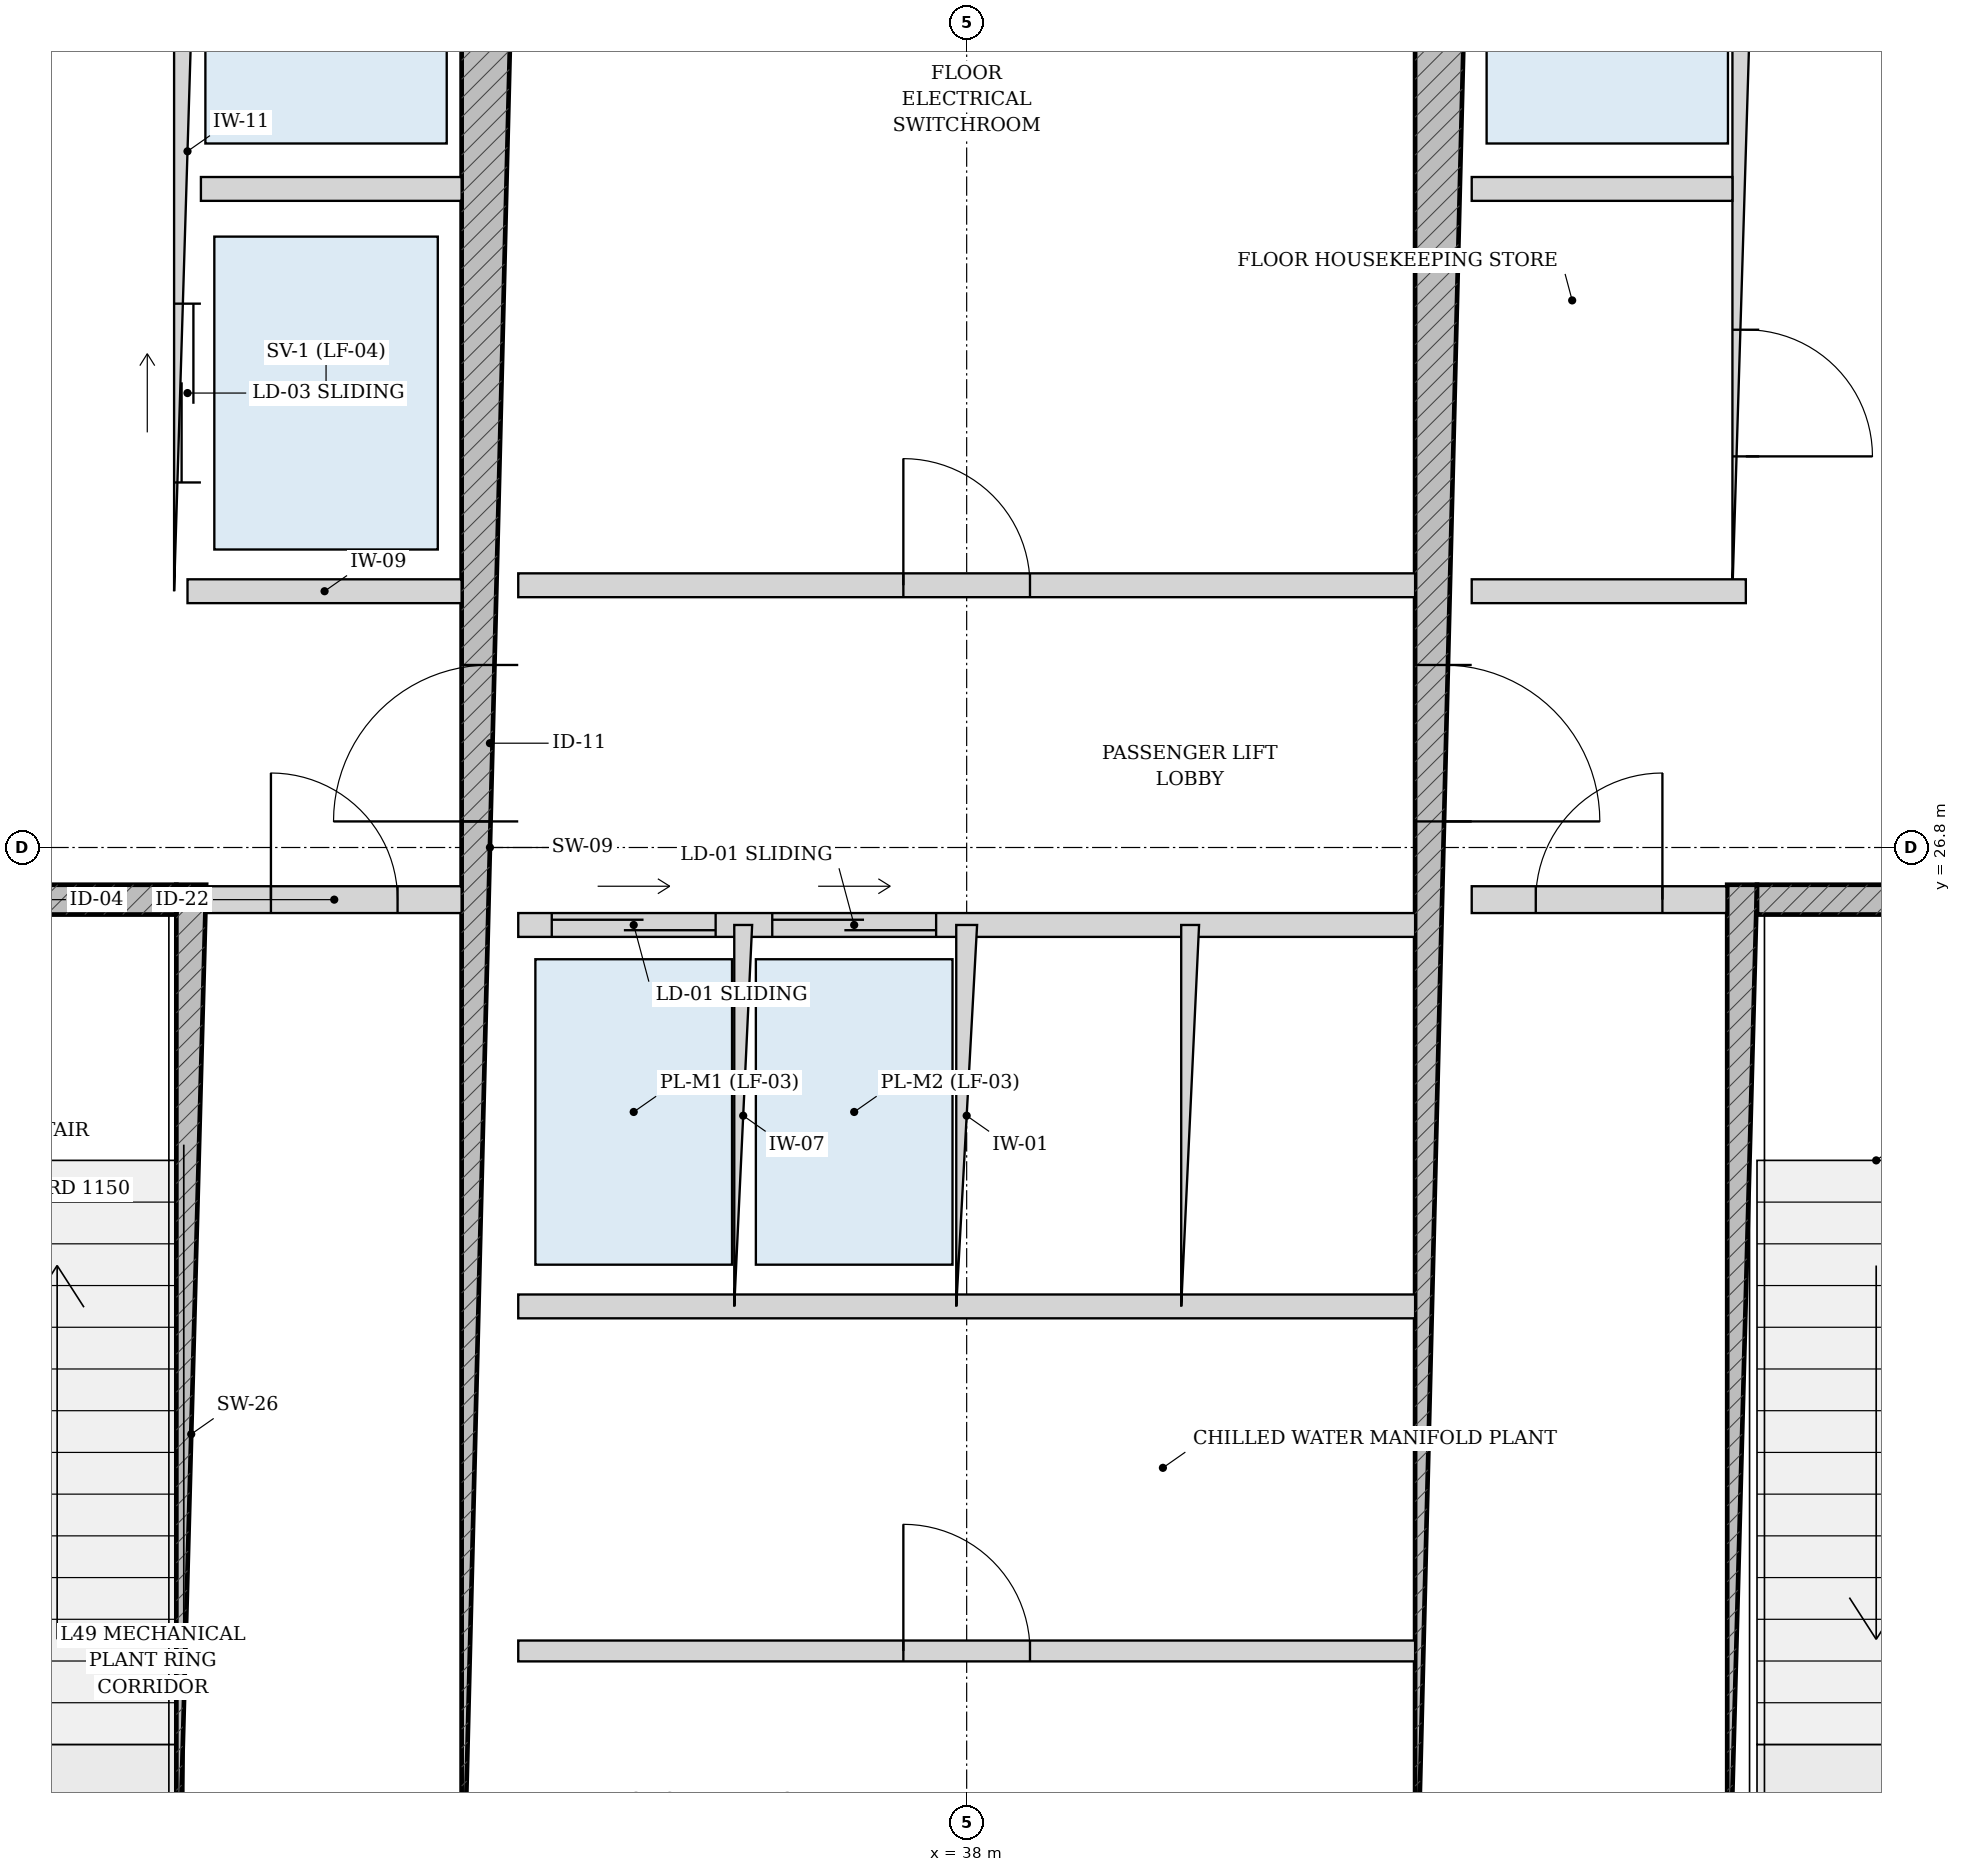
"""IFC4 building model, lengths in metres.
Left out: names, types, materials, properties, quantities, classifications, styles, units other than length and angle.
Written with IfcOpenShell. Run it as: python <this file> out.ifc"""

import sys

from ifc_helpers import new_model, si_unit, direction, frame, frame_2d, origin, place, context, subcontext, project, spatial, rectangle, extrude, source, transform, mapped, element, fill, save


model = new_model("IFC4")
c1 = context("Model", 3, precision=1e-05, world=origin(), true_north=direction((-0.2419218956, 0.970295726276)))
c2 = subcontext(c1, "Body", "Model", "MODEL_VIEW")
j1 = project(units=[si_unit("LENGTHUNIT", "METRE"), si_unit("PLANEANGLEUNIT", "RADIAN")], contexts=[c1])
p1 = place(None, origin())
s1 = spatial("IfcSite", under=j1, at=p1, CompositionType="ELEMENT")
p2 = place(p1, origin())
s2 = spatial("IfcBuilding", under=s1, at=p2, CompositionType="ELEMENT")
p3 = place(p2, frame((0.0, 0.0, 185.8)))
s3 = spatial("IfcBuildingStorey", under=s2, at=p3, CompositionType="ELEMENT", Elevation=185.8)
p4 = place(p3, frame((32.795, 19.175, 0.0), z_axis=(0.0, 0.0, 1.0), x_axis=(0.0, 1.0, 0.0)))
e1 = element("IfcWall", 1, at=p4, inside=s3, PredefinedType="SOLIDWALL", context=c2, shape_type="SweptSolid", body=[
    extrude(rectangle(XDim=7.375, YDim=0.2, at=frame_2d((3.688, 0.0))), origin(), (0.0, 0.0, 1.0), 5.135),
])
p5 = place(p3, frame((29.375, 26.45, 0.0), z_axis=(0.0, 0.0, 1.0), x_axis=(1.0, 0.0, 0.0)))
e2 = element("IfcWall", 2, at=p5, inside=s3, PredefinedType="SOLIDWALL", context=c2, shape_type="SweptSolid", body=[
    extrude(rectangle(XDim=3.32, YDim=0.2, at=frame_2d((1.66, 0.0))), origin(), (0.0, 0.0, 1.0), 5.135),
])
p6 = place(p5, frame((1.185, 0.0, 0.0)))
e3 = element("IfcOpeningElement", 3, at=p6, cuts=e2, PredefinedType="OPENING", context=c2, shape_type="SweptSolid", body=[
    extrude(rectangle(XDim=0.95, YDim=2.15, at=frame_2d((0.475, 1.075))), frame((0.0, 0.11, 0.0), z_axis=(0.0, -1.0, 0.0), x_axis=(1.0, 0.0, 0.0)), (0.0, 0.0, 1.0), 0.22),
])
p7 = place(p3, frame((43.205, 19.175, 0.0), z_axis=(0.0, 0.0, 1.0), x_axis=(0.0, 1.0, 0.0)))
e4 = element("IfcWall", 4, at=p7, inside=s3, PredefinedType="SOLIDWALL", context=c2, shape_type="SweptSolid", body=[
    extrude(rectangle(XDim=7.375, YDim=0.2, at=frame_2d((3.688, 0.0))), origin(), (0.0, 0.0, 1.0), 5.135),
])
p8 = place(p3, frame((43.305, 26.45, 0.0), z_axis=(0.0, 0.0, 1.0), x_axis=(1.0, 0.0, 0.0)))
e5 = element("IfcWall", 5, at=p8, inside=s3, PredefinedType="SOLIDWALL", context=c2, shape_type="SweptSolid", body=[
    extrude(rectangle(XDim=3.32, YDim=0.2, at=frame_2d((1.66, 0.0))), origin(), (0.0, 0.0, 1.0), 5.135),
])
p9 = place(p8, frame((1.185, 0.0, 0.0)))
e6 = element("IfcOpeningElement", 6, at=p9, cuts=e5, PredefinedType="OPENING", context=c2, shape_type="SweptSolid", body=[
    extrude(rectangle(XDim=0.95, YDim=2.15, at=frame_2d((0.475, 1.075))), frame((0.0, 0.11, 0.0), z_axis=(0.0, -1.0, 0.0), x_axis=(1.0, 0.0, 0.0)), (0.0, 0.0, 1.0), 0.22),
])
p10 = place(p3, frame((34.8, 19.175, 0.0), z_axis=(0.0, 0.0, 1.0), x_axis=(0.0, 1.0, 0.0)))
e7 = element("IfcWall", 7, at=p10, inside=s3, PredefinedType="SHEAR", context=c2, shape_type="SweptSolid", body=[
    extrude(rectangle(XDim=15.25, YDim=0.38, at=frame_2d((7.625, 0.0))), origin(), (0.0, 0.0, 1.0), 5.135),
])
p11 = place(p10, frame((7.8, 0.0, 0.0)))
e8 = element("IfcOpeningElement", 8, at=p11, cuts=e7, PredefinedType="OPENING", context=c2, shape_type="SweptSolid", body=[
    extrude(rectangle(XDim=1.05, YDim=2.15, at=frame_2d((0.525, 1.075))), frame((0.0, 0.2, 0.0), z_axis=(0.0, -1.0, 0.0), x_axis=(1.0, 0.0, 0.0)), (0.0, 0.0, 1.0), 0.4),
])
p12 = place(p3, frame((41.2, 19.175, 0.0), z_axis=(0.0, 0.0, 1.0), x_axis=(0.0, 1.0, 0.0)))
e9 = element("IfcWall", 9, at=p12, inside=s3, PredefinedType="SHEAR", context=c2, shape_type="SweptSolid", body=[
    extrude(rectangle(XDim=15.25, YDim=0.38, at=frame_2d((7.625, 0.0))), origin(), (0.0, 0.0, 1.0), 5.135),
])
p13 = place(p12, frame((7.8, 0.0, 0.0)))
e10 = element("IfcOpeningElement", 10, at=p13, cuts=e9, PredefinedType="OPENING", context=c2, shape_type="SweptSolid", body=[
    extrude(rectangle(XDim=1.05, YDim=2.15, at=frame_2d((0.525, 1.075))), frame((0.0, 0.2, 0.0), z_axis=(0.0, -1.0, 0.0), x_axis=(1.0, 0.0, 0.0)), (0.0, 0.0, 1.0), 0.4),
])
p14 = place(p3, frame((32.9, 26.45, 0.0), z_axis=(0.0, 0.0, 1.0), x_axis=(1.0, 0.0, 0.0)))
e11 = element("IfcWall", 11, at=p14, inside=s3, PredefinedType="PARTITIONING", context=c2, shape_type="SweptSolid", body=[
    extrude(rectangle(XDim=1.71, YDim=0.18, at=frame_2d((0.855, 0.0))), origin(), (0.0, 0.0, 1.0), 5.135),
])
p15 = place(p14, frame((0.43, 0.0, 0.0)))
e12 = element("IfcOpeningElement", 12, at=p15, cuts=e11, PredefinedType="OPENING", context=c2, shape_type="SweptSolid", body=[
    extrude(rectangle(XDim=0.85, YDim=2.1, at=frame_2d((0.425, 1.05))), frame((0.0, 0.1, 0.0), z_axis=(0.0, -1.0, 0.0), x_axis=(1.0, 0.0, 0.0)), (0.0, 0.0, 1.0), 0.2),
])
p16 = place(p3, frame((41.39, 26.45, 0.0), z_axis=(0.0, 0.0, 1.0), x_axis=(1.0, 0.0, 0.0)))
e13 = element("IfcWall", 13, at=p16, inside=s3, PredefinedType="PARTITIONING", context=c2, shape_type="SweptSolid", body=[
    extrude(rectangle(XDim=1.71, YDim=0.18, at=frame_2d((0.855, 0.0))), origin(), (0.0, 0.0, 1.0), 5.135),
])
p17 = place(p16, frame((0.43, 0.0, 0.0)))
e14 = element("IfcOpeningElement", 14, at=p17, cuts=e13, PredefinedType="OPENING", context=c2, shape_type="SweptSolid", body=[
    extrude(rectangle(XDim=0.85, YDim=2.1, at=frame_2d((0.425, 1.05))), frame((0.0, 0.1, 0.0), z_axis=(0.0, -1.0, 0.0), x_axis=(1.0, 0.0, 0.0)), (0.0, 0.0, 1.0), 0.2),
])
p18 = place(p3, frame((32.77, 28.52, 0.0), z_axis=(0.0, 0.0, 1.0), x_axis=(0.0, 1.0, 0.0)))
e15 = element("IfcWall", 15, at=p18, inside=s3, PredefinedType="PARTITIONING", context=c2, shape_type="SweptSolid", body=[
    extrude(rectangle(XDim=5.905, YDim=0.18, at=frame_2d((2.953, 0.0))), origin(), (0.0, 0.0, 1.0), 5.135),
])
p19 = place(p18, frame((3.655, 0.0, 0.0)))
e16 = element("IfcOpeningElement", 16, at=p19, cuts=e15, PredefinedType="OPENING", context=c2, shape_type="SweptSolid", body=[
    extrude(rectangle(XDim=1.15, YDim=2.2, at=frame_2d((0.575, 1.1))), frame((0.0, 0.1, 0.0), z_axis=(0.0, -1.0, 0.0), x_axis=(1.0, 0.0, 0.0)), (0.0, 0.0, 1.0), 0.2),
])
p20 = place(p18, frame((0.73, 0.0, 0.0)))
e17 = element("IfcOpeningElement", 17, at=p20, cuts=e15, PredefinedType="OPENING", context=c2, shape_type="SweptSolid", body=[
    extrude(rectangle(XDim=1.2, YDim=2.25, at=frame_2d((0.6, 1.125))), frame((0.0, 0.1, 0.0), z_axis=(0.0, -1.0, 0.0), x_axis=(1.0, 0.0, 0.0)), (0.0, 0.0, 1.0), 0.2),
])
p21 = place(p3, frame((32.86, 31.22, 0.0), z_axis=(0.0, 0.0, 1.0), x_axis=(1.0, 0.0, 0.0)))
e18 = element("IfcWall", 18, at=p21, inside=s3, PredefinedType="PARTITIONING", context=c2, shape_type="SweptSolid", body=[
    extrude(rectangle(XDim=1.75, YDim=0.16, at=frame_2d((0.875, 0.0))), origin(), (0.0, 0.0, 1.0), 5.135),
])
p22 = place(p3, frame((32.77, 28.52, 0.0), z_axis=(0.0, 0.0, 1.0), x_axis=(1.0, 0.0, 0.0)))
e19 = element("IfcWall", 19, at=p22, inside=s3, PredefinedType="PARTITIONING", context=c2, shape_type="SweptSolid", body=[
    extrude(rectangle(XDim=1.84, YDim=0.16, at=frame_2d((0.92, 0.0))), origin(), (0.0, 0.0, 1.0), 5.135),
])
p23 = place(p3, frame((43.23, 28.52, 0.0), z_axis=(0.0, 0.0, 1.0), x_axis=(0.0, 1.0, 0.0)))
e20 = element("IfcWall", 20, at=p23, inside=s3, PredefinedType="PARTITIONING", context=c2, shape_type="SweptSolid", body=[
    extrude(rectangle(XDim=5.905, YDim=0.18, at=frame_2d((2.953, 0.0))), origin(), (0.0, 0.0, 1.0), 5.135),
])
p24 = place(p23, frame((0.905, 0.0, 0.0)))
e21 = element("IfcOpeningElement", 21, at=p24, cuts=e20, PredefinedType="OPENING", context=c2, shape_type="SweptSolid", body=[
    extrude(rectangle(XDim=0.85, YDim=2.1, at=frame_2d((0.425, 1.05))), frame((0.0, 0.1, 0.0), z_axis=(0.0, -1.0, 0.0), x_axis=(1.0, 0.0, 0.0)), (0.0, 0.0, 1.0), 0.2),
])
p25 = place(p23, frame((3.655, 0.0, 0.0)))
e22 = element("IfcOpeningElement", 22, at=p25, cuts=e20, PredefinedType="OPENING", context=c2, shape_type="SweptSolid", body=[
    extrude(rectangle(XDim=1.15, YDim=2.2, at=frame_2d((0.575, 1.1))), frame((0.0, 0.1, 0.0), z_axis=(0.0, -1.0, 0.0), x_axis=(1.0, 0.0, 0.0)), (0.0, 0.0, 1.0), 0.2),
])
p26 = place(p3, frame((41.39, 31.22, 0.0), z_axis=(0.0, 0.0, 1.0), x_axis=(1.0, 0.0, 0.0)))
e23 = element("IfcWall", 23, at=p26, inside=s3, PredefinedType="PARTITIONING", context=c2, shape_type="SweptSolid", body=[
    extrude(rectangle(XDim=1.75, YDim=0.16, at=frame_2d((0.875, 0.0))), origin(), (0.0, 0.0, 1.0), 5.135),
])
p27 = place(p3, frame((41.39, 28.52, 0.0), z_axis=(0.0, 0.0, 1.0), x_axis=(1.0, 0.0, 0.0)))
e24 = element("IfcWall", 24, at=p27, inside=s3, PredefinedType="PARTITIONING", context=c2, shape_type="SweptSolid", body=[
    extrude(rectangle(XDim=1.84, YDim=0.16, at=frame_2d((0.92, 0.0))), origin(), (0.0, 0.0, 1.0), 5.135),
])
p28 = place(p3, frame((34.99, 28.56, 0.0), z_axis=(0.0, 0.0, 1.0), x_axis=(1.0, 0.0, 0.0)))
e25 = element("IfcWall", 25, at=p28, inside=s3, PredefinedType="PARTITIONING", context=c2, shape_type="SweptSolid", body=[
    extrude(rectangle(XDim=6.02, YDim=0.16, at=frame_2d((3.01, 0.0))), origin(), (0.0, 0.0, 1.0), 5.135),
])
p29 = place(p28, frame((2.585, 0.0, 0.0)))
e26 = element("IfcOpeningElement", 26, at=p29, cuts=e25, PredefinedType="OPENING", context=c2, shape_type="SweptSolid", body=[
    extrude(rectangle(XDim=0.85, YDim=2.1, at=frame_2d((0.425, 1.05))), frame((0.0, 0.09, 0.0), z_axis=(0.0, -1.0, 0.0), x_axis=(1.0, 0.0, 0.0)), (0.0, 0.0, 1.0), 0.18),
])
p30 = place(p3, frame((34.99, 26.28, 0.0), z_axis=(0.0, 0.0, 1.0), x_axis=(1.0, 0.0, 0.0)))
e27 = element("IfcWall", 27, at=p30, inside=s3, PredefinedType="PARTITIONING", context=c2, shape_type="SweptSolid", body=[
    extrude(rectangle(XDim=6.02, YDim=0.16, at=frame_2d((3.01, 0.0))), origin(), (0.0, 0.0, 1.0), 5.135),
])
p31 = place(p30, frame((0.225, 0.0, 0.0)))
e28 = element("IfcOpeningElement", 28, at=p31, cuts=e27, PredefinedType="OPENING", context=c2, shape_type="SweptSolid", body=[
    extrude(rectangle(XDim=1.1, YDim=2.2, at=frame_2d((0.55, 1.1))), frame((0.0, 0.09, 0.0), z_axis=(0.0, -1.0, 0.0), x_axis=(1.0, 0.0, 0.0)), (0.0, 0.0, 1.0), 0.18),
])
p32 = place(p30, frame((1.705, 0.0, 0.0)))
e29 = element("IfcOpeningElement", 29, at=p32, cuts=e27, PredefinedType="OPENING", context=c2, shape_type="SweptSolid", body=[
    extrude(rectangle(XDim=1.1, YDim=2.2, at=frame_2d((0.55, 1.1))), frame((0.0, 0.09, 0.0), z_axis=(0.0, -1.0, 0.0), x_axis=(1.0, 0.0, 0.0)), (0.0, 0.0, 1.0), 0.18),
])
p33 = place(p3, frame((34.99, 23.72, 0.0), z_axis=(0.0, 0.0, 1.0), x_axis=(1.0, 0.0, 0.0)))
e30 = element("IfcWall", 30, at=p33, inside=s3, PredefinedType="PARTITIONING", context=c2, shape_type="SweptSolid", body=[
    extrude(rectangle(XDim=6.02, YDim=0.16, at=frame_2d((3.01, 0.0))), origin(), (0.0, 0.0, 1.0), 5.135),
])
p34 = place(p3, frame((36.5, 23.72, 0.0), z_axis=(0.0, 0.0, 1.0), x_axis=(0.0, 1.0, 0.0)))
e31 = element("IfcWall", 31, at=p34, inside=s3, PredefinedType="PARTITIONING", context=c2, shape_type="SweptSolid", body=[
    extrude(rectangle(XDim=2.56, YDim=0.12, at=frame_2d((1.28, 0.0))), origin(), (0.0, 0.0, 1.0), 5.135),
])
p35 = place(p3, frame((38.0, 23.72, 0.0), z_axis=(0.0, 0.0, 1.0), x_axis=(0.0, 1.0, 0.0)))
e32 = element("IfcWall", 32, at=p35, inside=s3, PredefinedType="PARTITIONING", context=c2, shape_type="SweptSolid", body=[
    extrude(rectangle(XDim=2.56, YDim=0.14, at=frame_2d((1.28, 0.0))), origin(), (0.0, 0.0, 1.0), 5.135),
])
p36 = place(p3, frame((39.5, 23.72, 0.0), z_axis=(0.0, 0.0, 1.0), x_axis=(0.0, 1.0, 0.0)))
e33 = element("IfcWall", 33, at=p36, inside=s3, PredefinedType="PARTITIONING", context=c2, shape_type="SweptSolid", body=[
    extrude(rectangle(XDim=2.56, YDim=0.12, at=frame_2d((1.28, 0.0))), origin(), (0.0, 0.0, 1.0), 5.135),
])
p37 = place(p3, frame((34.99, 21.407, 0.0), z_axis=(0.0, 0.0, 1.0), x_axis=(1.0, 0.0, 0.0)))
e34 = element("IfcWall", 34, at=p37, inside=s3, PredefinedType="PARTITIONING", context=c2, shape_type="SweptSolid", body=[
    extrude(rectangle(XDim=6.02, YDim=0.14, at=frame_2d((3.01, 0.0))), origin(), (0.0, 0.0, 1.0), 5.135),
])
p38 = place(p37, frame((2.585, 0.0, 0.0)))
e35 = element("IfcOpeningElement", 35, at=p38, cuts=e34, PredefinedType="OPENING", context=c2, shape_type="SweptSolid", body=[
    extrude(rectangle(XDim=0.85, YDim=2.1, at=frame_2d((0.425, 1.05))), frame((0.0, 0.08, 0.0), z_axis=(0.0, -1.0, 0.0), x_axis=(1.0, 0.0, 0.0)), (0.0, 0.0, 1.0), 0.16),
])
m1 = source(origin(), c2, "Body", "SweptSolid", [
    extrude(rectangle(XDim=1.05, YDim=2.15, at=frame_2d((0.525, 1.075))), frame((0.0, 0.025, 0.0), z_axis=(0.0, -1.0, 0.0), x_axis=(1.0, 0.0, 0.0)), (0.0, 0.0, 1.0), 0.05),
])
p39 = place(p11, origin())
e36 = element("IfcDoor", 36, at=p39, inside=s3, OperationType="SINGLE_SWING_LEFT", PredefinedType="DOOR", context=c2, shape_type="MappedRepresentation", body=[
    mapped(m1, transform((0.0, 0.0, 0.0), scale=1.0)),
])
fill(e8, e36)
p40 = place(p13, frame((1.05, 0.0, 0.0), z_axis=(0.0, 0.0, 1.0), x_axis=(-1.0, 0.0, 0.0)))
e37 = element("IfcDoor", 37, at=p40, inside=s3, OperationType="SINGLE_SWING_RIGHT", PredefinedType="DOOR", context=c2, shape_type="MappedRepresentation", body=[
    mapped(m1, transform((0.0, 0.0, 0.0), scale=1.0)),
])
fill(e10, e37)
m2 = source(origin(), c2, "Body", "SweptSolid", [
    extrude(rectangle(XDim=0.85, YDim=2.1, at=frame_2d((0.425, 1.05))), frame((0.0, 0.025, 0.0), z_axis=(0.0, -1.0, 0.0), x_axis=(1.0, 0.0, 0.0)), (0.0, 0.0, 1.0), 0.05),
])
p41 = place(p15, origin())
e38 = element("IfcDoor", 38, at=p41, inside=s3, OperationType="SINGLE_SWING_LEFT", PredefinedType="DOOR", context=c2, shape_type="MappedRepresentation", body=[
    mapped(m2, transform((0.0, 0.0, 0.0), scale=1.0)),
])
fill(e12, e38)
p42 = place(p17, origin())
e39 = element("IfcDoor", 39, at=p42, inside=s3, OperationType="SINGLE_SWING_RIGHT", PredefinedType="DOOR", context=c2, shape_type="MappedRepresentation", body=[
    mapped(m2, transform((0.0, 0.0, 0.0), scale=1.0)),
])
fill(e14, e39)
p43 = place(p24, frame((0.85, 0.0, 0.0), z_axis=(0.0, 0.0, 1.0), x_axis=(-1.0, 0.0, 0.0)))
e40 = element("IfcDoor", 40, at=p43, inside=s3, OperationType="SINGLE_SWING_RIGHT", PredefinedType="DOOR", context=c2, shape_type="MappedRepresentation", body=[
    mapped(m2, transform((0.0, 0.0, 0.0), scale=1.0)),
])
fill(e21, e40)
p44 = place(p29, origin())
e41 = element("IfcDoor", 41, at=p44, inside=s3, OperationType="SINGLE_SWING_LEFT", PredefinedType="DOOR", context=c2, shape_type="MappedRepresentation", body=[
    mapped(m2, transform((0.0, 0.0, 0.0), scale=1.0)),
])
fill(e26, e41)
p45 = place(p38, origin())
e42 = element("IfcDoor", 42, at=p45, inside=s3, OperationType="SINGLE_SWING_LEFT", PredefinedType="DOOR", context=c2, shape_type="MappedRepresentation", body=[
    mapped(m2, transform((0.0, 0.0, 0.0), scale=1.0)),
])
fill(e35, e42)
m3 = source(origin(), c2, "Body", "SweptSolid", [
    extrude(rectangle(XDim=1.2, YDim=2.25, at=frame_2d((0.6, 1.125))), frame((0.0, 0.025, 0.0), z_axis=(0.0, -1.0, 0.0), x_axis=(1.0, 0.0, 0.0)), (0.0, 0.0, 1.0), 0.05),
])
p46 = place(p20, origin())
e43 = element("IfcDoor", 43, at=p46, inside=s3, OperationType="DOUBLE_DOOR_SLIDING", PredefinedType="DOOR", context=c2, shape_type="MappedRepresentation", body=[
    mapped(m3, transform((0.0, 0.0, 0.0), scale=1.0)),
])
fill(e17, e43)
m4 = source(origin(), c2, "Body", "SweptSolid", [
    extrude(rectangle(XDim=1.1, YDim=2.2, at=frame_2d((0.55, 1.1))), frame((0.0, 0.025, 0.0), z_axis=(0.0, -1.0, 0.0), x_axis=(1.0, 0.0, 0.0)), (0.0, 0.0, 1.0), 0.05),
])
p47 = place(p31, origin())
e44 = element("IfcDoor", 44, at=p47, inside=s3, OperationType="DOUBLE_DOOR_SLIDING", PredefinedType="DOOR", context=c2, shape_type="MappedRepresentation", body=[
    mapped(m4, transform((0.0, 0.0, 0.0), scale=1.0)),
])
fill(e28, e44)
p48 = place(p32, origin())
e45 = element("IfcDoor", 45, at=p48, inside=s3, OperationType="DOUBLE_DOOR_SLIDING", PredefinedType="DOOR", context=c2, shape_type="MappedRepresentation", body=[
    mapped(m4, transform((0.0, 0.0, 0.0), scale=1.0)),
])
fill(e29, e45)
save(model, sys.argv[1])
